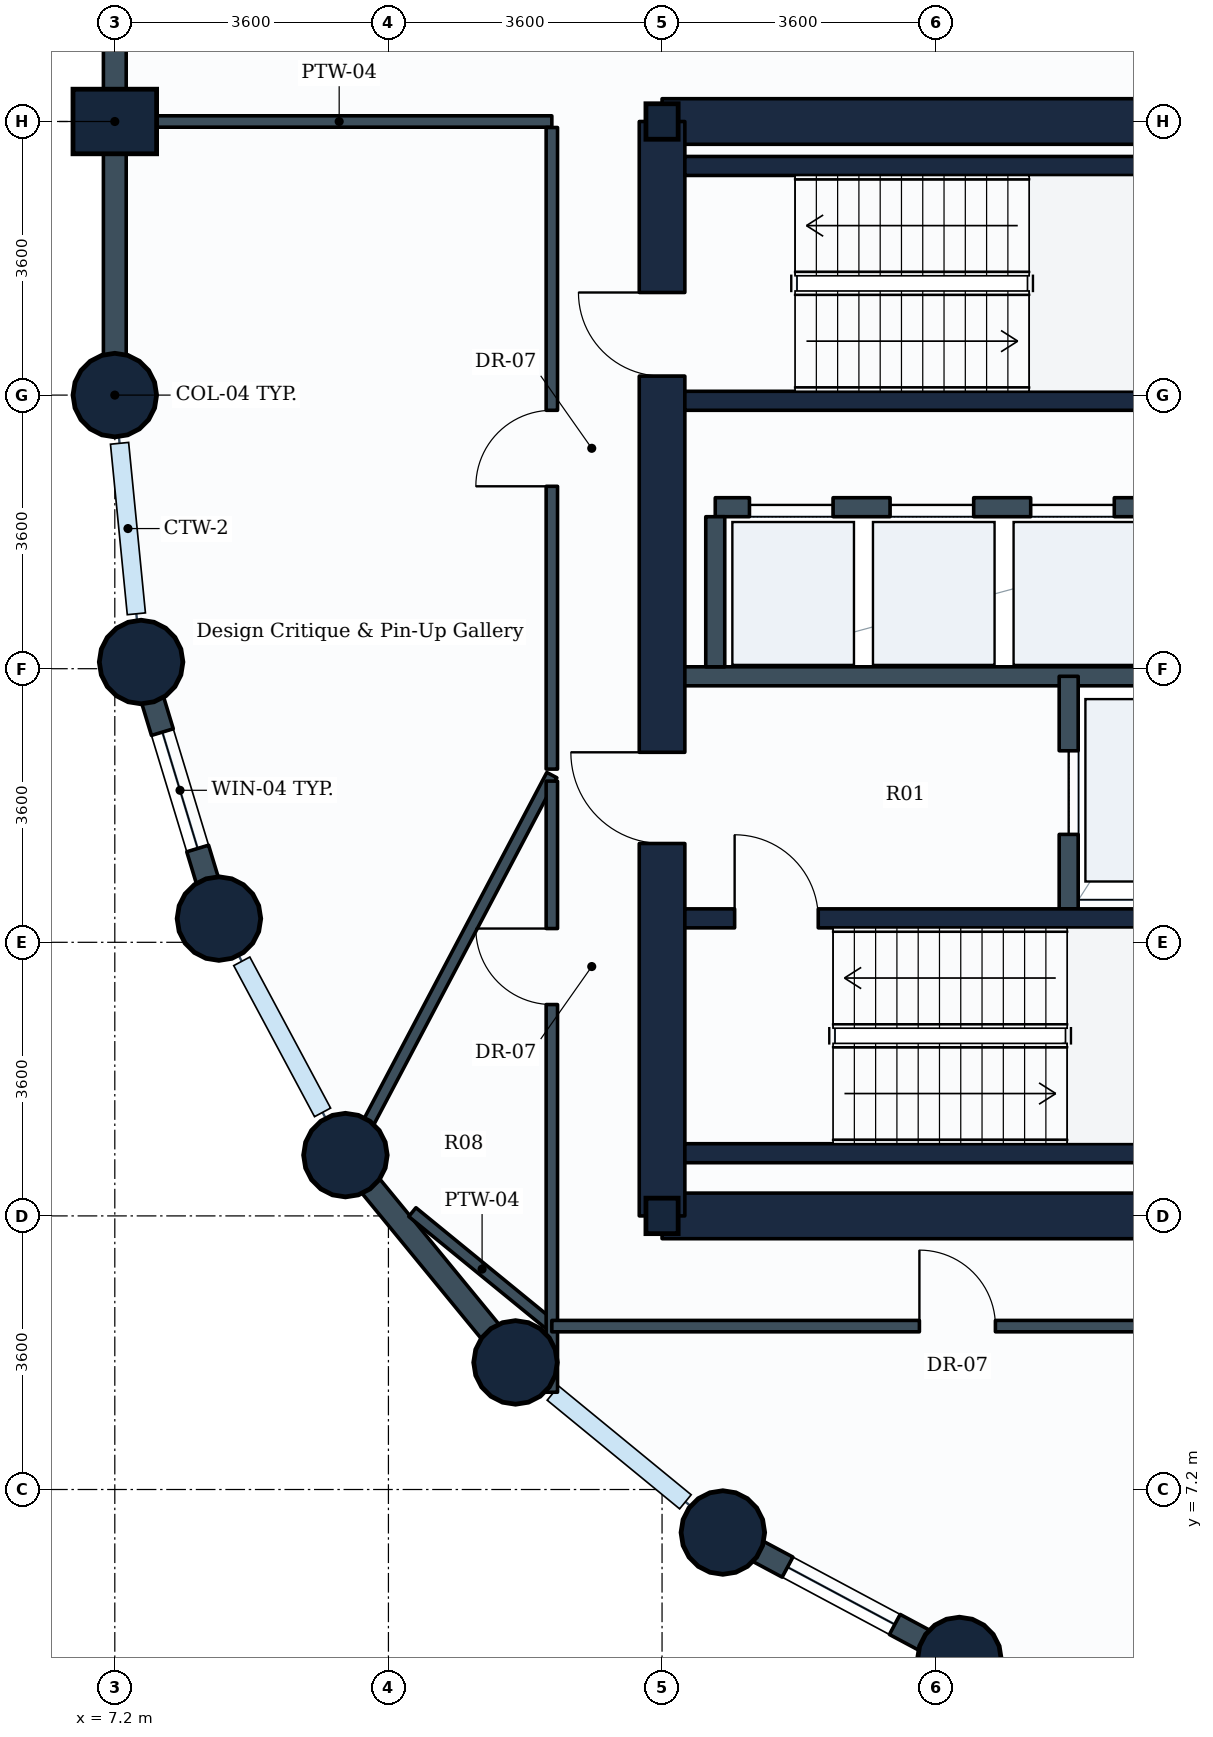
"""IFC4 building model, lengths in metres.
Left out: names, types, materials, properties, quantities, classifications, styles, units other than length and angle.
Written with IfcOpenShell. Run it as: python <this file> out.ifc"""

import sys

from ifc_helpers import new_model, si_unit, direction, frame, frame_2d, origin, origin_2d, place, context, subcontext, project, spatial, rectangle, circle, i_section, extrude, element, fill, save


model = new_model("IFC4")
c1 = context("Model", 3, precision=1e-05, world=origin(), true_north=direction((0.0, 1.0)))
c2 = subcontext(c1, "Body", "Model", "MODEL_VIEW")
j1 = project(units=[si_unit("LENGTHUNIT", "METRE"), si_unit("PLANEANGLEUNIT", "RADIAN")], contexts=[c1])
p1 = place(None, origin())
s1 = spatial("IfcSite", under=j1, at=p1, CompositionType="ELEMENT")
p2 = place(p1, origin())
s2 = spatial("IfcBuilding", under=s1, at=p2, CompositionType="ELEMENT")
p3 = place(p2, frame((0.0, 0.0, 99.6)))
s3 = spatial("IfcBuildingStorey", under=s2, at=p3, CompositionType="ELEMENT", Elevation=99.6)
p4 = place(p3, frame((7.2, 21.6, 0.0), z_axis=(0.0, 0.0, 1.0), x_axis=(1.0, 0.0, 0.0)))
e1 = element("IfcColumn", 1, at=p4, inside=s3, PredefinedType="COLUMN", context=c2, shape_type="SweptSolid", body=[
    extrude(circle(Radius=0.55, at=origin_2d()), origin(), (0.0, 0.0, 1.0), 3.9),
])
p5 = place(p3, frame((7.2, 25.2, 0.0), z_axis=(0.0, 0.0, 1.0), x_axis=(0.0, 1.0, 0.0)))
e2 = element("IfcColumn", 2, at=p5, inside=s3, PredefinedType="COLUMN", context=c2, shape_type="SweptSolid", body=[
    extrude(rectangle(XDim=0.85, YDim=1.1, at=origin_2d()), origin(), (0.0, 0.0, 1.0), 3.9),
])
for number, where, z_axis, x_axis in (
    (3, (7.546, 18.088, 0.0), (0.0, 0.0, 1.0), (1.0, 0.0, 0.0)),
    (4, (8.57, 14.712, 0.0), (0.0, 0.0, 1.0), (1.0, 0.0, 0.0)),
    (5, (10.234, 11.6, 0.0), (0.0, 0.0, 1.0), (1.0, 0.0, 0.0)),
    (6, (12.472, 8.872, 0.0), (0.0, 0.0, 1.0), (1.0, 0.0, 0.0)),
):
    element("IfcColumn", number, at=place(p3, frame(where, z_axis=z_axis, x_axis=x_axis)), inside=s3, PredefinedType="COLUMN", context=c2, shape_type="SweptSolid", body=[
        extrude(circle(Radius=0.55, at=origin_2d()), origin(), (0.0, 0.0, 1.0), 3.9),
    ])
for number, where, z_axis, x_axis in (
    (7, (14.4, 10.8, 0.0), (0.0, 0.0, 1.0), (1.0, 0.0, 0.0)),
    (8, (14.4, 25.2, 0.0), (0.0, 0.0, 1.0), (1.0, 0.0, 0.0)),
):
    element("IfcColumn", number, at=place(p3, frame(where, z_axis=z_axis, x_axis=x_axis)), inside=s3, PredefinedType="COLUMN", context=c2, shape_type="SweptSolid", body=[
        extrude(i_section(OverallWidth=0.424, OverallDepth=0.467, WebThickness=0.033, FlangeThickness=0.053, FilletRadius=0.015, at=origin_2d()), origin(), (0.0, 0.0, 1.0), 3.9),
    ])
for number, where, z_axis, x_axis in (
    (9, (15.2, 6.634, 0.0), (0.0, 0.0, 1.0), (1.0, 0.0, 0.0)),
    (10, (18.312, 4.97, 0.0), (0.0, 0.0, 1.0), (1.0, 0.0, 0.0)),
):
    element("IfcColumn", number, at=place(p3, frame(where, z_axis=z_axis, x_axis=x_axis)), inside=s3, PredefinedType="COLUMN", context=c2, shape_type="SweptSolid", body=[
        extrude(circle(Radius=0.55, at=origin_2d()), origin(), (0.0, 0.0, 1.0), 3.9),
    ])
p6 = place(p3, frame((7.2, 25.2, 0.0), z_axis=(0.0, 0.0, 1.0), x_axis=(0.0, 1.0, 0.0)))
e11 = element("IfcWall", 11, at=p6, inside=s3, PredefinedType="STANDARD", context=c2, shape_type="SweptSolid", body=[
    extrude(rectangle(XDim=3.6, YDim=0.3, at=frame_2d((1.8, 0.0))), origin(), (0.0, 0.0, 1.0), 2.93),
])
p7 = place(p3, frame((7.2, 21.6, 0.0), z_axis=(0.0, 0.0, 1.0), x_axis=(0.0, 1.0, 0.0)))
e12 = element("IfcWall", 12, at=p7, inside=s3, PredefinedType="STANDARD", context=c2, shape_type="SweptSolid", body=[
    extrude(rectangle(XDim=3.6, YDim=0.3, at=frame_2d((1.8, 0.0))), origin(), (0.0, 0.0, 1.0), 2.93),
])
p8 = place(p3, frame((8.57, 14.712, 0.0), z_axis=(0.0, 0.0, 1.0), x_axis=(-0.290305086481, 0.956934144423, 0.0)))
e13 = element("IfcWall", 13, at=p8, inside=s3, PredefinedType="STANDARD", context=c2, shape_type="SweptSolid", body=[
    extrude(rectangle(XDim=3.528, YDim=0.3, at=frame_2d((1.764, 0.0))), origin(), (0.0, 0.0, 1.0), 2.93),
])
p9 = place(p8, frame((0.964, 0.0, 0.85)))
e14 = element("IfcOpeningElement", 14, at=p9, cuts=e13, PredefinedType="OPENING", context=c2, shape_type="SweptSolid", body=[
    extrude(rectangle(XDim=1.6, YDim=1.35, at=frame_2d((0.8, 0.675))), frame((0.0, 0.16, 0.0), z_axis=(0.0, -1.0, 0.0), x_axis=(1.0, 0.0, 0.0)), (0.0, 0.0, 1.0), 0.32),
])
p10 = place(p3, frame((12.472, 8.872, 0.0), z_axis=(0.0, 0.0, 1.0), x_axis=(-0.634258295121, 0.773121216285, 0.0)))
e15 = element("IfcWall", 15, at=p10, inside=s3, PredefinedType="STANDARD", context=c2, shape_type="SweptSolid", body=[
    extrude(rectangle(XDim=3.529, YDim=0.3, at=frame_2d((1.764, 0.0))), origin(), (0.0, 0.0, 1.0), 2.93),
])
p11 = place(p3, frame((18.312, 4.97, 0.0), z_axis=(0.0, 0.0, 1.0), x_axis=(-0.881846862014, 0.471535907389, 0.0)))
e16 = element("IfcWall", 16, at=p11, inside=s3, PredefinedType="STANDARD", context=c2, shape_type="SweptSolid", body=[
    extrude(rectangle(XDim=3.529, YDim=0.3, at=frame_2d((1.765, 0.0))), origin(), (0.0, 0.0, 1.0), 2.93),
])
p12 = place(p11, frame((0.964, 0.0, 0.85)))
e17 = element("IfcOpeningElement", 17, at=p12, cuts=e16, PredefinedType="OPENING", context=c2, shape_type="SweptSolid", body=[
    extrude(rectangle(XDim=1.6, YDim=1.35, at=frame_2d((0.8, 0.675))), frame((0.0, 0.16, 0.0), z_axis=(0.0, -1.0, 0.0), x_axis=(1.0, 0.0, 0.0)), (0.0, 0.0, 1.0), 0.32),
])
p13 = place(p3, frame((14.4, 10.8, 0.0), z_axis=(0.0, 0.0, 1.0), x_axis=(1.0, 0.0, 0.0)))
e18 = element("IfcWall", 18, at=p13, inside=s3, PredefinedType="SHEAR", context=c2, shape_type="SweptSolid", body=[
    extrude(rectangle(XDim=18.0, YDim=0.6, at=frame_2d((9.0, 0.0))), origin(), (0.0, 0.0, 1.0), 3.65),
])
p14 = place(p3, frame((14.4, 25.2, 0.0), z_axis=(0.0, 0.0, 1.0), x_axis=(1.0, 0.0, 0.0)))
e19 = element("IfcWall", 19, at=p14, inside=s3, PredefinedType="SHEAR", context=c2, shape_type="SweptSolid", body=[
    extrude(rectangle(XDim=14.4, YDim=0.6, at=frame_2d((7.2, 0.0))), origin(), (0.0, 0.0, 1.0), 3.65),
])
p15 = place(p3, frame((14.4, 10.8, 0.0), z_axis=(0.0, 0.0, 1.0), x_axis=(0.0, 1.0, 0.0)))
e20 = element("IfcWall", 20, at=p15, inside=s3, PredefinedType="SHEAR", context=c2, shape_type="SweptSolid", body=[
    extrude(rectangle(XDim=14.4, YDim=0.6, at=frame_2d((7.2, 0.0))), origin(), (0.0, 0.0, 1.0), 3.65),
])
p16 = place(p15, frame((11.05, 0.0, 0.0)))
e21 = element("IfcOpeningElement", 21, at=p16, cuts=e20, PredefinedType="OPENING", context=c2, shape_type="SweptSolid", body=[
    extrude(rectangle(XDim=1.1, YDim=2.1, at=frame_2d((0.55, 1.05))), frame((0.0, 0.31, 0.0), z_axis=(0.0, -1.0, 0.0), x_axis=(1.0, 0.0, 0.0)), (0.0, 0.0, 1.0), 0.62),
])
p17 = place(p15, frame((4.9, 0.0, 0.0)))
e22 = element("IfcOpeningElement", 22, at=p17, cuts=e20, PredefinedType="OPENING", context=c2, shape_type="SweptSolid", body=[
    extrude(rectangle(XDim=1.2, YDim=2.1, at=frame_2d((0.6, 1.05))), frame((0.0, 0.31, 0.0), z_axis=(0.0, -1.0, 0.0), x_axis=(1.0, 0.0, 0.0)), (0.0, 0.0, 1.0), 0.62),
])
p18 = place(p3, frame((14.7, 11.625, 0.0), z_axis=(0.0, 0.0, 1.0), x_axis=(1.0, 0.0, 0.0)))
e23 = element("IfcWall", 23, at=p18, inside=s3, PredefinedType="SHEAR", context=c2, shape_type="SweptSolid", body=[
    extrude(rectangle(XDim=8.65, YDim=0.25, at=frame_2d((4.325, 0.0))), origin(), (0.0, 0.0, 1.0), 3.65),
])
p19 = place(p3, frame((14.7, 14.715, 0.0), z_axis=(0.0, 0.0, 1.0), x_axis=(1.0, 0.0, 0.0)))
e24 = element("IfcWall", 24, at=p19, inside=s3, PredefinedType="SHEAR", context=c2, shape_type="SweptSolid", body=[
    extrude(rectangle(XDim=8.65, YDim=0.25, at=frame_2d((4.325, 0.0))), origin(), (0.0, 0.0, 1.0), 3.65),
])
p20 = place(p19, frame((0.655, 0.0, 0.0)))
e25 = element("IfcOpeningElement", 25, at=p20, cuts=e24, PredefinedType="OPENING", context=c2, shape_type="SweptSolid", body=[
    extrude(rectangle(XDim=1.1, YDim=2.1, at=frame_2d((0.55, 1.05))), frame((0.0, 0.135, 0.0), z_axis=(0.0, -1.0, 0.0), x_axis=(1.0, 0.0, 0.0)), (0.0, 0.0, 1.0), 0.27),
])
for number, where, z_axis, x_axis in (
    (26, (14.7, 21.525, 0.0), (0.0, 0.0, 1.0), (1.0, 0.0, 0.0)),
    (27, (14.7, 24.615, 0.0), (0.0, 0.0, 1.0), (1.0, 0.0, 0.0)),
):
    element("IfcWall", number, at=place(p3, frame(where, z_axis=z_axis, x_axis=x_axis)), inside=s3, PredefinedType="SHEAR", context=c2, shape_type="SweptSolid", body=[
        extrude(rectangle(XDim=8.2, YDim=0.25, at=frame_2d((4.1, 0.0))), origin(), (0.0, 0.0, 1.0), 3.65),
    ])
p21 = place(p3, frame((14.65, 17.9, 0.0), z_axis=(0.0, 0.0, 1.0), x_axis=(1.0, 0.0, 0.0)))
e28 = element("IfcWall", 28, at=p21, inside=s3, PredefinedType="PARTITIONING", context=c2, shape_type="SweptSolid", body=[
    extrude(rectangle(XDim=7.15, YDim=0.25, at=frame_2d((3.575, 0.0))), origin(), (0.0, 0.0, 1.0), 3.635),
])
p22 = place(p3, frame((19.75, 14.84, 0.0), z_axis=(0.0, 0.0, 1.0), x_axis=(0.0, 1.0, 0.0)))
e29 = element("IfcWall", 29, at=p22, inside=s3, PredefinedType="PARTITIONING", context=c2, shape_type="SweptSolid", body=[
    extrude(rectangle(XDim=3.06, YDim=0.25, at=frame_2d((1.53, 0.0))), origin(), (0.0, 0.0, 1.0), 3.635),
])
p23 = place(p22, frame((0.98, 0.0, 0.0)))
e30 = element("IfcOpeningElement", 30, at=p23, cuts=e29, PredefinedType="OPENING", context=c2, shape_type="SweptSolid", body=[
    extrude(rectangle(XDim=1.1, YDim=2.1, at=frame_2d((0.55, 1.05))), frame((0.0, 0.135, 0.0), z_axis=(0.0, -1.0, 0.0), x_axis=(1.0, 0.0, 0.0)), (0.0, 0.0, 1.0), 0.27),
])
p24 = place(p3, frame((15.1, 20.125, 0.0), z_axis=(0.0, 0.0, 1.0), x_axis=(1.0, 0.0, 0.0)))
e31 = element("IfcWall", 31, at=p24, inside=s3, PredefinedType="PARTITIONING", context=c2, shape_type="SweptSolid", body=[
    extrude(rectangle(XDim=7.55, YDim=0.25, at=frame_2d((3.775, 0.0))), origin(), (0.0, 0.0, 1.0), 3.635),
])
p25 = place(p24, frame((0.45, 0.0, 0.0)))
e32 = element("IfcOpeningElement", 32, at=p25, cuts=e31, PredefinedType="OPENING", context=c2, shape_type="SweptSolid", body=[
    extrude(rectangle(XDim=1.1, YDim=2.1, at=frame_2d((0.55, 1.05))), frame((0.0, 0.135, 0.0), z_axis=(0.0, -1.0, 0.0), x_axis=(1.0, 0.0, 0.0)), (0.0, 0.0, 1.0), 0.27),
])
p26 = place(p24, frame((2.3, 0.0, 0.0)))
e33 = element("IfcOpeningElement", 33, at=p26, cuts=e31, PredefinedType="OPENING", context=c2, shape_type="SweptSolid", body=[
    extrude(rectangle(XDim=1.1, YDim=2.1, at=frame_2d((0.55, 1.05))), frame((0.0, 0.135, 0.0), z_axis=(0.0, -1.0, 0.0), x_axis=(1.0, 0.0, 0.0)), (0.0, 0.0, 1.0), 0.27),
])
p27 = place(p24, frame((4.15, 0.0, 0.0)))
e34 = element("IfcOpeningElement", 34, at=p27, cuts=e31, PredefinedType="OPENING", context=c2, shape_type="SweptSolid", body=[
    extrude(rectangle(XDim=1.1, YDim=2.1, at=frame_2d((0.55, 1.05))), frame((0.0, 0.135, 0.0), z_axis=(0.0, -1.0, 0.0), x_axis=(1.0, 0.0, 0.0)), (0.0, 0.0, 1.0), 0.27),
])
p28 = place(p24, frame((6.0, 0.0, 0.0)))
e35 = element("IfcOpeningElement", 35, at=p28, cuts=e31, PredefinedType="OPENING", context=c2, shape_type="SweptSolid", body=[
    extrude(rectangle(XDim=1.1, YDim=2.1, at=frame_2d((0.55, 1.05))), frame((0.0, 0.135, 0.0), z_axis=(0.0, -1.0, 0.0), x_axis=(1.0, 0.0, 0.0)), (0.0, 0.0, 1.0), 0.27),
])
p29 = place(p3, frame((15.1, 18.025, 0.0), z_axis=(0.0, 0.0, 1.0), x_axis=(0.0, 1.0, 0.0)))
e36 = element("IfcWall", 36, at=p29, inside=s3, PredefinedType="PARTITIONING", context=c2, shape_type="SweptSolid", body=[
    extrude(rectangle(XDim=1.975, YDim=0.25, at=frame_2d((0.988, 0.0))), origin(), (0.0, 0.0, 1.0), 3.635),
])
p30 = place(p3, frame((7.354, 25.2, 0.0), z_axis=(0.0, 0.0, 1.0), x_axis=(1.0, 0.0, 0.0)))
e37 = element("IfcWall", 37, at=p30, inside=s3, PredefinedType="PARTITIONING", context=c2, shape_type="SweptSolid", body=[
    extrude(rectangle(XDim=5.596, YDim=0.15, at=frame_2d((2.798, 0.0))), origin(), (0.0, 0.0, 1.0), 3.635),
])
p31 = place(p3, frame((12.95, 9.35, 0.0), z_axis=(0.0, 0.0, 1.0), x_axis=(-0.774315108081, 0.632800216022, 0.0)))
e38 = element("IfcWall", 38, at=p31, inside=s3, PredefinedType="PARTITIONING", context=c2, shape_type="SweptSolid", body=[
    extrude(rectangle(XDim=2.37, YDim=0.15, at=frame_2d((1.185, 0.0))), origin(), (0.0, 0.0, 1.0), 2.93),
])
p32 = place(p3, frame((12.95, 16.6, 0.0), z_axis=(0.0, 0.0, 1.0), x_axis=(-0.466703496606, -0.88441384332, 0.0)))
e39 = element("IfcWall", 39, at=p32, inside=s3, PredefinedType="PARTITIONING", context=c2, shape_type="SweptSolid", body=[
    extrude(rectangle(XDim=5.581, YDim=0.15, at=frame_2d((2.791, 0.0))), origin(), (0.0, 0.0, 1.0), 2.93),
])
p33 = place(p3, frame((12.95, 16.679, 0.0), z_axis=(0.0, 0.0, 1.0), x_axis=(0.0, 1.0, 0.0)))
e40 = element("IfcWall", 40, at=p33, inside=s3, PredefinedType="PARTITIONING", context=c2, shape_type="SweptSolid", body=[
    extrude(rectangle(XDim=8.442, YDim=0.15, at=frame_2d((4.221, 0.0))), origin(), (0.0, 0.0, 1.0), 3.19),
])
p34 = place(p33, frame((3.721, 0.0, 0.0)))
e41 = element("IfcOpeningElement", 41, at=p34, cuts=e40, PredefinedType="OPENING", context=c2, shape_type="SweptSolid", body=[
    extrude(rectangle(XDim=1.0, YDim=2.1, at=frame_2d((0.5, 1.05))), frame((0.0, 0.085, 0.0), z_axis=(0.0, -1.0, 0.0), x_axis=(1.0, 0.0, 0.0)), (0.0, 0.0, 1.0), 0.17),
])
p35 = place(p3, frame((12.95, 8.48, 0.0), z_axis=(0.0, 0.0, 1.0), x_axis=(0.0, 1.0, 0.0)))
e42 = element("IfcWall", 42, at=p35, inside=s3, PredefinedType="PARTITIONING", context=c2, shape_type="SweptSolid", body=[
    extrude(rectangle(XDim=8.041, YDim=0.15, at=frame_2d((4.021, 0.0))), origin(), (0.0, 0.0, 1.0), 2.93),
])
p36 = place(p35, frame((5.101, 0.0, 0.0)))
e43 = element("IfcOpeningElement", 43, at=p36, cuts=e42, PredefinedType="OPENING", context=c2, shape_type="SweptSolid", body=[
    extrude(rectangle(XDim=1.0, YDim=2.1, at=frame_2d((0.5, 1.05))), frame((0.0, 0.085, 0.0), z_axis=(0.0, -1.0, 0.0), x_axis=(1.0, 0.0, 0.0)), (0.0, 0.0, 1.0), 0.17),
])
p37 = place(p3, frame((12.95, 9.35, 0.0), z_axis=(0.0, 0.0, 1.0), x_axis=(1.0, 0.0, 0.0)))
e44 = element("IfcWall", 44, at=p37, inside=s3, PredefinedType="PARTITIONING", context=c2, shape_type="SweptSolid", body=[
    extrude(rectangle(XDim=15.771, YDim=0.15, at=frame_2d((7.885, 0.0))), origin(), (0.0, 0.0, 1.0), 3.18),
])
p38 = place(p37, frame((4.836, 0.0, 0.0)))
e45 = element("IfcOpeningElement", 45, at=p38, cuts=e44, PredefinedType="OPENING", context=c2, shape_type="SweptSolid", body=[
    extrude(rectangle(XDim=1.0, YDim=2.1, at=frame_2d((0.5, 1.05))), frame((0.0, 0.085, 0.0), z_axis=(0.0, -1.0, 0.0), x_axis=(1.0, 0.0, 0.0)), (0.0, 0.0, 1.0), 0.17),
])
p39 = place(p9, origin())
e46 = element("IfcWindow", 46, at=p39, inside=s3, PartitioningType="SINGLE_PANEL", PredefinedType="WINDOW", context=c2, shape_type="SweptSolid", body=[
    extrude(rectangle(XDim=1.6, YDim=1.35, at=frame_2d((0.8, 0.675))), frame((0.0, 0.03, 0.0), z_axis=(0.0, -1.0, 0.0), x_axis=(1.0, 0.0, 0.0)), (0.0, 0.0, 1.0), 0.06),
])
fill(e14, e46)
p40 = place(p12, origin())
e47 = element("IfcWindow", 47, at=p40, inside=s3, PartitioningType="SINGLE_PANEL", PredefinedType="WINDOW", context=c2, shape_type="SweptSolid", body=[
    extrude(rectangle(XDim=1.6, YDim=1.35, at=frame_2d((0.8, 0.675))), frame((0.0, 0.03, 0.0), z_axis=(0.0, -1.0, 0.0), x_axis=(1.0, 0.0, 0.0)), (0.0, 0.0, 1.0), 0.06),
])
fill(e17, e47)
p41 = place(p20, origin())
e48 = element("IfcDoor", 48, at=p41, inside=s3, OperationType="SINGLE_SWING_LEFT", PredefinedType="DOOR", context=c2, shape_type="SweptSolid", body=[
    extrude(rectangle(XDim=1.1, YDim=2.1, at=frame_2d((0.55, 1.05))), frame((0.0, 0.025, 0.0), z_axis=(0.0, -1.0, 0.0), x_axis=(1.0, 0.0, 0.0)), (0.0, 0.0, 1.0), 0.05),
])
fill(e25, e48)
p42 = place(p16, origin())
e49 = element("IfcDoor", 49, at=p42, inside=s3, OperationType="SINGLE_SWING_RIGHT", PredefinedType="DOOR", context=c2, shape_type="SweptSolid", body=[
    extrude(rectangle(XDim=1.1, YDim=2.1, at=frame_2d((0.55, 1.05))), frame((0.0, 0.025, 0.0), z_axis=(0.0, -1.0, 0.0), x_axis=(1.0, 0.0, 0.0)), (0.0, 0.0, 1.0), 0.05),
])
fill(e21, e49)
p43 = place(p23, origin())
e50 = element("IfcDoor", 50, at=p43, inside=s3, OperationType="SLIDING_TO_LEFT", PredefinedType="DOOR", context=c2, shape_type="SweptSolid", body=[
    extrude(rectangle(XDim=1.1, YDim=2.1, at=frame_2d((0.55, 1.05))), frame((0.0, 0.025, 0.0), z_axis=(0.0, -1.0, 0.0), x_axis=(1.0, 0.0, 0.0)), (0.0, 0.0, 1.0), 0.05),
])
fill(e30, e50)
p44 = place(p17, origin())
e51 = element("IfcDoor", 51, at=p44, inside=s3, OperationType="SINGLE_SWING_RIGHT", PredefinedType="DOOR", context=c2, shape_type="SweptSolid", body=[
    extrude(rectangle(XDim=1.2, YDim=2.1, at=frame_2d((0.6, 1.05))), frame((0.0, 0.025, 0.0), z_axis=(0.0, -1.0, 0.0), x_axis=(1.0, 0.0, 0.0)), (0.0, 0.0, 1.0), 0.05),
])
fill(e22, e51)
p45 = place(p25, origin())
e52 = element("IfcDoor", 52, at=p45, inside=s3, OperationType="SLIDING_TO_LEFT", PredefinedType="DOOR", context=c2, shape_type="SweptSolid", body=[
    extrude(rectangle(XDim=1.1, YDim=2.1, at=frame_2d((0.55, 1.05))), frame((0.0, 0.025, 0.0), z_axis=(0.0, -1.0, 0.0), x_axis=(1.0, 0.0, 0.0)), (0.0, 0.0, 1.0), 0.05),
])
fill(e32, e52)
p46 = place(p26, origin())
e53 = element("IfcDoor", 53, at=p46, inside=s3, OperationType="SLIDING_TO_LEFT", PredefinedType="DOOR", context=c2, shape_type="SweptSolid", body=[
    extrude(rectangle(XDim=1.1, YDim=2.1, at=frame_2d((0.55, 1.05))), frame((0.0, 0.025, 0.0), z_axis=(0.0, -1.0, 0.0), x_axis=(1.0, 0.0, 0.0)), (0.0, 0.0, 1.0), 0.05),
])
fill(e33, e53)
p47 = place(p27, origin())
e54 = element("IfcDoor", 54, at=p47, inside=s3, OperationType="SLIDING_TO_LEFT", PredefinedType="DOOR", context=c2, shape_type="SweptSolid", body=[
    extrude(rectangle(XDim=1.1, YDim=2.1, at=frame_2d((0.55, 1.05))), frame((0.0, 0.025, 0.0), z_axis=(0.0, -1.0, 0.0), x_axis=(1.0, 0.0, 0.0)), (0.0, 0.0, 1.0), 0.05),
])
fill(e34, e54)
p48 = place(p34, origin())
e55 = element("IfcDoor", 55, at=p48, inside=s3, OperationType="SINGLE_SWING_LEFT", PredefinedType="DOOR", context=c2, shape_type="SweptSolid", body=[
    extrude(rectangle(XDim=1.0, YDim=2.1, at=frame_2d((0.5, 1.05))), frame((0.0, 0.025, 0.0), z_axis=(0.0, -1.0, 0.0), x_axis=(1.0, 0.0, 0.0)), (0.0, 0.0, 1.0), 0.05),
])
fill(e41, e55)
p49 = place(p36, origin())
e56 = element("IfcDoor", 56, at=p49, inside=s3, OperationType="SINGLE_SWING_RIGHT", PredefinedType="DOOR", context=c2, shape_type="SweptSolid", body=[
    extrude(rectangle(XDim=1.0, YDim=2.1, at=frame_2d((0.5, 1.05))), frame((0.0, 0.025, 0.0), z_axis=(0.0, -1.0, 0.0), x_axis=(1.0, 0.0, 0.0)), (0.0, 0.0, 1.0), 0.05),
])
fill(e43, e56)
p50 = place(p38, origin())
e57 = element("IfcDoor", 57, at=p50, inside=s3, OperationType="SINGLE_SWING_LEFT", PredefinedType="DOOR", context=c2, shape_type="SweptSolid", body=[
    extrude(rectangle(XDim=1.0, YDim=2.1, at=frame_2d((0.5, 1.05))), frame((0.0, 0.025, 0.0), z_axis=(0.0, -1.0, 0.0), x_axis=(1.0, 0.0, 0.0)), (0.0, 0.0, 1.0), 0.05),
])
fill(e45, e57)
save(model, sys.argv[1])
